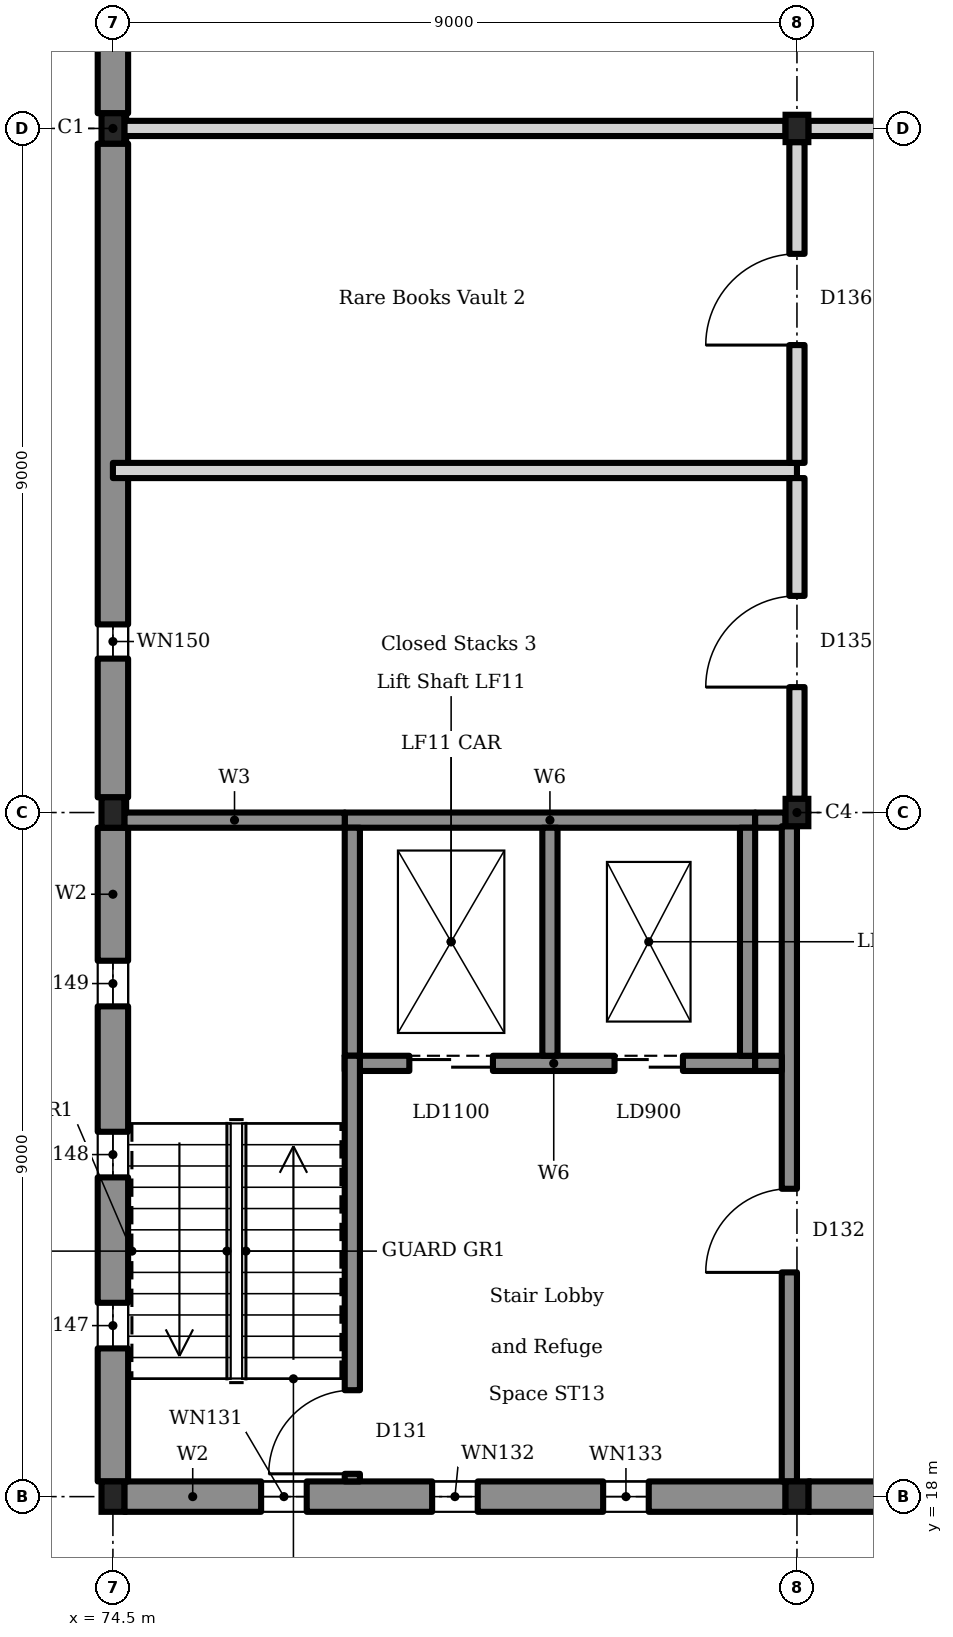
"""IFC4 building model, lengths in metres.
Left out: names, types, materials, properties, quantities, classifications, styles, units other than length and angle.
Written with IfcOpenShell. Run it as: python <this file> out.ifc"""

import sys

from ifc_helpers import new_model, si_unit, direction, frame, frame_2d, origin, origin_2d, place, context, subcontext, project, spatial, rectangle, i_section, extrude, element, fill, save


model = new_model("IFC4")
c1 = context("Model", 3, precision=1e-05, world=origin(), true_north=direction((0.0, 1.0)))
c2 = subcontext(c1, "Body", "Model", "MODEL_VIEW")
j1 = project(units=[si_unit("LENGTHUNIT", "METRE"), si_unit("PLANEANGLEUNIT", "RADIAN")], contexts=[c1])
p1 = place(None, origin())
s1 = spatial("IfcSite", under=j1, at=p1, CompositionType="ELEMENT")
p2 = place(p1, origin())
s2 = spatial("IfcBuilding", under=s1, at=p2, CompositionType="ELEMENT")
p3 = place(p2, frame((0.0, 0.0, 18.9)))
s3 = spatial("IfcBuildingStorey", under=s2, at=p3, CompositionType="ELEMENT", Elevation=18.9)
for number, where, z_axis, x_axis in (
    (1, (74.5, 18.0, 0.0), (0.0, 0.0, 1.0), (1.0, 0.0, 0.0)),
    (2, (83.5, 18.0, 0.0), (0.0, 0.0, 1.0), (1.0, 0.0, 0.0)),
    (3, (74.5, 27.0, 0.0), (0.0, 0.0, 1.0), (1.0, 0.0, 0.0)),
):
    element("IfcColumn", number, at=place(p3, frame(where, z_axis=z_axis, x_axis=x_axis)), inside=s3, PredefinedType="COLUMN", context=c2, shape_type="SweptSolid", body=[
        extrude(i_section(OverallWidth=0.3, OverallDepth=0.4, WebThickness=0.013, FlangeThickness=0.024, FilletRadius=0.027, at=origin_2d()), origin(), (0.0, 0.0, 1.0), 4.5),
    ])
p4 = place(p3, frame((83.5, 27.0, 0.0), z_axis=(0.0, 0.0, 1.0), x_axis=(1.0, 0.0, 0.0)))
e4 = element("IfcColumn", 4, at=p4, inside=s3, PredefinedType="COLUMN", context=c2, shape_type="SweptSolid", body=[
    extrude(i_section(OverallWidth=0.3, OverallDepth=0.36, WebThickness=0.012, FlangeThickness=0.022, FilletRadius=0.027, at=origin_2d()), origin(), (0.0, 0.0, 1.0), 4.5),
])
p5 = place(p3, frame((74.5, 36.0, 0.0), z_axis=(0.0, 0.0, 1.0), x_axis=(1.0, 0.0, 0.0)))
e5 = element("IfcColumn", 5, at=p5, inside=s3, PredefinedType="COLUMN", context=c2, shape_type="SweptSolid", body=[
    extrude(i_section(OverallWidth=0.3, OverallDepth=0.4, WebThickness=0.013, FlangeThickness=0.024, FilletRadius=0.027, at=origin_2d()), origin(), (0.0, 0.0, 1.0), 4.5),
])
p6 = place(p3, frame((83.5, 36.0, 0.0), z_axis=(0.0, 0.0, 1.0), x_axis=(1.0, 0.0, 0.0)))
e6 = element("IfcColumn", 6, at=p6, inside=s3, PredefinedType="COLUMN", context=c2, shape_type="SweptSolid", body=[
    extrude(i_section(OverallWidth=0.3, OverallDepth=0.36, WebThickness=0.012, FlangeThickness=0.022, FilletRadius=0.027, at=origin_2d()), origin(), (0.0, 0.0, 1.0), 4.5),
])
p7 = place(p3, frame((77.55, 23.7, 0.0), z_axis=(0.0, 0.0, 1.0), x_axis=(1.0, 0.0, 0.0)))
e7 = element("IfcWall", 7, at=p7, inside=s3, PredefinedType="SOLIDWALL", context=c2, shape_type="SweptSolid", body=[
    extrude(rectangle(XDim=5.4, YDim=0.2, at=frame_2d((2.7, 0.0))), origin(), (0.0, 0.0, 1.0), 4.25),
])
p8 = place(p7, frame((0.85, 0.0, 0.0)))
e8 = element("IfcOpeningElement", 8, at=p8, cuts=e7, PredefinedType="OPENING", context=c2, shape_type="SweptSolid", body=[
    extrude(rectangle(XDim=1.1, YDim=2.1, at=frame_2d((0.55, 1.05))), frame((0.0, 0.11, 0.0), z_axis=(0.0, -1.0, 0.0), x_axis=(1.0, 0.0, 0.0)), (0.0, 0.0, 1.0), 0.22),
])
p9 = place(p7, frame((3.55, 0.0, 0.0)))
e9 = element("IfcOpeningElement", 9, at=p9, cuts=e7, PredefinedType="OPENING", context=c2, shape_type="SweptSolid", body=[
    extrude(rectangle(XDim=0.9, YDim=2.1, at=frame_2d((0.45, 1.05))), frame((0.0, 0.11, 0.0), z_axis=(0.0, -1.0, 0.0), x_axis=(1.0, 0.0, 0.0)), (0.0, 0.0, 1.0), 0.22),
])
p10 = place(p3, frame((77.55, 26.9, 0.0), z_axis=(0.0, 0.0, 1.0), x_axis=(1.0, 0.0, 0.0)))
e10 = element("IfcWall", 10, at=p10, inside=s3, PredefinedType="SOLIDWALL", context=c2, shape_type="SweptSolid", body=[
    extrude(rectangle(XDim=5.4, YDim=0.2, at=frame_2d((2.7, 0.0))), origin(), (0.0, 0.0, 1.0), 4.25),
])
for number, where, z_axis, x_axis in (
    (11, (77.65, 23.8, 0.0), (0.0, 0.0, 1.0), (0.0, 1.0, 0.0)),
    (12, (80.25, 23.8, 0.0), (0.0, 0.0, 1.0), (0.0, 1.0, 0.0)),
    (13, (82.85, 23.8, 0.0), (0.0, 0.0, 1.0), (0.0, 1.0, 0.0)),
):
    element("IfcWall", number, at=place(p3, frame(where, z_axis=z_axis, x_axis=x_axis)), inside=s3, PredefinedType="SOLIDWALL", context=c2, shape_type="SweptSolid", body=[
        extrude(rectangle(XDim=3.0, YDim=0.2, at=frame_2d((1.5, 0.0))), origin(), (0.0, 0.0, 1.0), 4.25),
    ])
p11 = place(p3, frame((74.65, 18.0, 0.0), z_axis=(0.0, 0.0, 1.0), x_axis=(1.0, 0.0, 0.0)))
e14 = element("IfcWall", 14, at=p11, inside=s3, PredefinedType="SOLIDWALL", context=c2, shape_type="SweptSolid", body=[
    extrude(rectangle(XDim=8.7, YDim=0.4, at=frame_2d((4.35, 0.0))), origin(), (0.0, 0.0, 1.0), 4.5),
])
p12 = place(p11, frame((1.8, 0.0, 0.9)))
e15 = element("IfcOpeningElement", 15, at=p12, cuts=e14, PredefinedType="OPENING", context=c2, shape_type="SweptSolid", body=[
    extrude(rectangle(XDim=0.6, YDim=2.4, at=frame_2d((0.3, 1.2))), frame((0.0, 0.21, 0.0), z_axis=(0.0, -1.0, 0.0), x_axis=(1.0, 0.0, 0.0)), (0.0, 0.0, 1.0), 0.42),
])
p13 = place(p11, frame((4.05, 0.0, 0.9)))
e16 = element("IfcOpeningElement", 16, at=p13, cuts=e14, PredefinedType="OPENING", context=c2, shape_type="SweptSolid", body=[
    extrude(rectangle(XDim=0.6, YDim=2.4, at=frame_2d((0.3, 1.2))), frame((0.0, 0.21, 0.0), z_axis=(0.0, -1.0, 0.0), x_axis=(1.0, 0.0, 0.0)), (0.0, 0.0, 1.0), 0.42),
])
p14 = place(p11, frame((6.3, 0.0, 0.9)))
e17 = element("IfcOpeningElement", 17, at=p14, cuts=e14, PredefinedType="OPENING", context=c2, shape_type="SweptSolid", body=[
    extrude(rectangle(XDim=0.6, YDim=2.4, at=frame_2d((0.3, 1.2))), frame((0.0, 0.21, 0.0), z_axis=(0.0, -1.0, 0.0), x_axis=(1.0, 0.0, 0.0)), (0.0, 0.0, 1.0), 0.42),
])
p15 = place(p3, frame((83.65, 18.0, 0.0), z_axis=(0.0, 0.0, 1.0), x_axis=(1.0, 0.0, 0.0)))
e18 = element("IfcWall", 18, at=p15, inside=s3, PredefinedType="SOLIDWALL", context=c2, shape_type="SweptSolid", body=[
    extrude(rectangle(XDim=8.7, YDim=0.4, at=frame_2d((4.35, 0.0))), origin(), (0.0, 0.0, 1.0), 4.5),
])
p16 = place(p15, frame((4.125, 0.0, 0.9)))
e19 = element("IfcOpeningElement", 19, at=p16, cuts=e18, PredefinedType="OPENING", context=c2, shape_type="SweptSolid", body=[
    extrude(rectangle(XDim=0.45, YDim=2.6, at=frame_2d((0.225, 1.3))), frame((0.0, 0.21, 0.0), z_axis=(0.0, -1.0, 0.0), x_axis=(1.0, 0.0, 0.0)), (0.0, 0.0, 1.0), 0.42),
])
p17 = place(p15, frame((6.375, 0.0, 0.9)))
e20 = element("IfcOpeningElement", 20, at=p17, cuts=e18, PredefinedType="OPENING", context=c2, shape_type="SweptSolid", body=[
    extrude(rectangle(XDim=0.45, YDim=2.6, at=frame_2d((0.225, 1.3))), frame((0.0, 0.21, 0.0), z_axis=(0.0, -1.0, 0.0), x_axis=(1.0, 0.0, 0.0)), (0.0, 0.0, 1.0), 0.42),
])
p18 = place(p3, frame((74.5, 18.2, 0.0), z_axis=(0.0, 0.0, 1.0), x_axis=(0.0, 1.0, 0.0)))
e21 = element("IfcWall", 21, at=p18, inside=s3, PredefinedType="SOLIDWALL", context=c2, shape_type="SweptSolid", body=[
    extrude(rectangle(XDim=8.6, YDim=0.4, at=frame_2d((4.3, 0.0))), origin(), (0.0, 0.0, 1.0), 4.5),
])
p19 = place(p18, frame((1.75, 0.0, 0.9)))
e22 = element("IfcOpeningElement", 22, at=p19, cuts=e21, PredefinedType="OPENING", context=c2, shape_type="SweptSolid", body=[
    extrude(rectangle(XDim=0.6, YDim=2.4, at=frame_2d((0.3, 1.2))), frame((0.0, 0.21, 0.0), z_axis=(0.0, -1.0, 0.0), x_axis=(1.0, 0.0, 0.0)), (0.0, 0.0, 1.0), 0.42),
])
p20 = place(p18, frame((4.0, 0.0, 0.9)))
e23 = element("IfcOpeningElement", 23, at=p20, cuts=e21, PredefinedType="OPENING", context=c2, shape_type="SweptSolid", body=[
    extrude(rectangle(XDim=0.6, YDim=2.4, at=frame_2d((0.3, 1.2))), frame((0.0, 0.21, 0.0), z_axis=(0.0, -1.0, 0.0), x_axis=(1.0, 0.0, 0.0)), (0.0, 0.0, 1.0), 0.42),
])
p21 = place(p18, frame((6.25, 0.0, 0.9)))
e24 = element("IfcOpeningElement", 24, at=p21, cuts=e21, PredefinedType="OPENING", context=c2, shape_type="SweptSolid", body=[
    extrude(rectangle(XDim=0.6, YDim=2.4, at=frame_2d((0.3, 1.2))), frame((0.0, 0.21, 0.0), z_axis=(0.0, -1.0, 0.0), x_axis=(1.0, 0.0, 0.0)), (0.0, 0.0, 1.0), 0.42),
])
p22 = place(p3, frame((74.5, 27.2, 0.0), z_axis=(0.0, 0.0, 1.0), x_axis=(0.0, 1.0, 0.0)))
e25 = element("IfcWall", 25, at=p22, inside=s3, PredefinedType="SOLIDWALL", context=c2, shape_type="SweptSolid", body=[
    extrude(rectangle(XDim=8.6, YDim=0.4, at=frame_2d((4.3, 0.0))), origin(), (0.0, 0.0, 1.0), 4.5),
])
p23 = place(p22, frame((1.825, 0.0, 0.9)))
e26 = element("IfcOpeningElement", 26, at=p23, cuts=e25, PredefinedType="OPENING", context=c2, shape_type="SweptSolid", body=[
    extrude(rectangle(XDim=0.45, YDim=2.6, at=frame_2d((0.225, 1.3))), frame((0.0, 0.21, 0.0), z_axis=(0.0, -1.0, 0.0), x_axis=(1.0, 0.0, 0.0)), (0.0, 0.0, 1.0), 0.42),
])
p24 = place(p3, frame((74.5, 36.2, 0.0), z_axis=(0.0, 0.0, 1.0), x_axis=(0.0, 1.0, 0.0)))
e27 = element("IfcWall", 27, at=p24, inside=s3, PredefinedType="SOLIDWALL", context=c2, shape_type="SweptSolid", body=[
    extrude(rectangle(XDim=8.45, YDim=0.4, at=frame_2d((4.225, 0.0))), origin(), (0.0, 0.0, 1.0), 4.5),
])
p25 = place(p24, frame((1.75, 0.0, 0.9)))
e28 = element("IfcOpeningElement", 28, at=p25, cuts=e27, PredefinedType="OPENING", context=c2, shape_type="SweptSolid", body=[
    extrude(rectangle(XDim=0.45, YDim=2.6, at=frame_2d((0.225, 1.3))), frame((0.0, 0.21, 0.0), z_axis=(0.0, -1.0, 0.0), x_axis=(1.0, 0.0, 0.0)), (0.0, 0.0, 1.0), 0.42),
])
p26 = place(p24, frame((4.0, 0.0, 0.9)))
e29 = element("IfcOpeningElement", 29, at=p26, cuts=e27, PredefinedType="OPENING", context=c2, shape_type="SweptSolid", body=[
    extrude(rectangle(XDim=0.45, YDim=2.6, at=frame_2d((0.225, 1.3))), frame((0.0, 0.21, 0.0), z_axis=(0.0, -1.0, 0.0), x_axis=(1.0, 0.0, 0.0)), (0.0, 0.0, 1.0), 0.42),
])
p27 = place(p24, frame((6.25, 0.0, 0.9)))
e30 = element("IfcOpeningElement", 30, at=p27, cuts=e27, PredefinedType="OPENING", context=c2, shape_type="SweptSolid", body=[
    extrude(rectangle(XDim=0.45, YDim=2.6, at=frame_2d((0.225, 1.3))), frame((0.0, 0.21, 0.0), z_axis=(0.0, -1.0, 0.0), x_axis=(1.0, 0.0, 0.0)), (0.0, 0.0, 1.0), 0.42),
])
p28 = place(p3, frame((74.65, 26.9, 0.0), z_axis=(0.0, 0.0, 1.0), x_axis=(1.0, 0.0, 0.0)))
e31 = element("IfcWall", 31, at=p28, inside=s3, PredefinedType="SOLIDWALL", context=c2, shape_type="SweptSolid", body=[
    extrude(rectangle(XDim=2.9, YDim=0.2, at=frame_2d((1.45, 0.0))), origin(), (0.0, 0.0, 1.0), 4.25),
])
p29 = place(p3, frame((82.95, 26.9, 0.0), z_axis=(0.0, 0.0, 1.0), x_axis=(1.0, 0.0, 0.0)))
e32 = element("IfcWall", 32, at=p29, inside=s3, PredefinedType="SOLIDWALL", context=c2, shape_type="SweptSolid", body=[
    extrude(rectangle(XDim=0.4, YDim=0.2, at=frame_2d((0.2, 0.0))), origin(), (0.0, 0.0, 1.0), 4.25),
])
p30 = place(p3, frame((83.4, 18.2, 0.0), z_axis=(0.0, 0.0, 1.0), x_axis=(0.0, 1.0, 0.0)))
e33 = element("IfcWall", 33, at=p30, inside=s3, PredefinedType="SOLIDWALL", context=c2, shape_type="SweptSolid", body=[
    extrude(rectangle(XDim=8.62, YDim=0.2, at=frame_2d((4.31, 0.0))), origin(), (0.0, 0.0, 1.0), 4.25),
])
p31 = place(p30, frame((2.75, 0.0, 0.0)))
e34 = element("IfcOpeningElement", 34, at=p31, cuts=e33, PredefinedType="OPENING", context=c2, shape_type="SweptSolid", body=[
    extrude(rectangle(XDim=1.1, YDim=2.1, at=frame_2d((0.55, 1.05))), frame((0.0, 0.11, 0.0), z_axis=(0.0, -1.0, 0.0), x_axis=(1.0, 0.0, 0.0)), (0.0, 0.0, 1.0), 0.22),
])
p32 = place(p3, frame((77.65, 18.2, 0.0), z_axis=(0.0, 0.0, 1.0), x_axis=(0.0, 1.0, 0.0)))
e35 = element("IfcWall", 35, at=p32, inside=s3, PredefinedType="SOLIDWALL", context=c2, shape_type="SweptSolid", body=[
    extrude(rectangle(XDim=5.6, YDim=0.2, at=frame_2d((2.8, 0.0))), origin(), (0.0, 0.0, 1.0), 4.25),
])
p33 = place(p32, frame((0.1, 0.0, 0.0)))
e36 = element("IfcOpeningElement", 36, at=p33, cuts=e35, PredefinedType="OPENING", context=c2, shape_type="SweptSolid", body=[
    extrude(rectangle(XDim=1.1, YDim=2.1, at=frame_2d((0.55, 1.05))), frame((0.0, 0.11, 0.0), z_axis=(0.0, -1.0, 0.0), x_axis=(1.0, 0.0, 0.0)), (0.0, 0.0, 1.0), 0.22),
])
p34 = place(p3, frame((82.95, 23.7, 0.0), z_axis=(0.0, 0.0, 1.0), x_axis=(1.0, 0.0, 0.0)))
e37 = element("IfcWall", 37, at=p34, inside=s3, PredefinedType="SOLIDWALL", context=c2, shape_type="SweptSolid", body=[
    extrude(rectangle(XDim=0.35, YDim=0.2, at=frame_2d((0.175, 0.0))), origin(), (0.0, 0.0, 1.0), 4.25),
])
p35 = place(p3, frame((74.5, 31.5, 0.0), z_axis=(0.0, 0.0, 1.0), x_axis=(1.0, 0.0, 0.0)))
e38 = element("IfcWall", 38, at=p35, inside=s3, PredefinedType="SOLIDWALL", context=c2, shape_type="SweptSolid", body=[
    extrude(rectangle(XDim=9.0, YDim=0.2, at=frame_2d((4.5, 0.0))), origin(), (0.0, 0.0, 1.0), 3.6),
])
p36 = place(p3, frame((74.65, 36.0, 0.0), z_axis=(0.0, 0.0, 1.0), x_axis=(1.0, 0.0, 0.0)))
e39 = element("IfcWall", 39, at=p36, inside=s3, PredefinedType="SOLIDWALL", context=c2, shape_type="SweptSolid", body=[
    extrude(rectangle(XDim=8.7, YDim=0.2, at=frame_2d((4.35, 0.0))), origin(), (0.0, 0.0, 1.0), 3.6),
])
p37 = place(p3, frame((83.65, 36.0, 0.0), z_axis=(0.0, 0.0, 1.0), x_axis=(1.0, 0.0, 0.0)))
e40 = element("IfcWall", 40, at=p37, inside=s3, PredefinedType="SOLIDWALL", context=c2, shape_type="SweptSolid", body=[
    extrude(rectangle(XDim=6.35, YDim=0.2, at=frame_2d((3.175, 0.0))), origin(), (0.0, 0.0, 1.0), 3.6),
])
p38 = place(p3, frame((83.5, 27.18, 0.0), z_axis=(0.0, 0.0, 1.0), x_axis=(0.0, 1.0, 0.0)))
e41 = element("IfcWall", 41, at=p38, inside=s3, PredefinedType="SOLIDWALL", context=c2, shape_type="SweptSolid", body=[
    extrude(rectangle(XDim=4.22, YDim=0.2, at=frame_2d((2.11, 0.0))), origin(), (0.0, 0.0, 1.0), 3.6),
])
p39 = place(p38, frame((1.47, 0.0, 0.0)))
e42 = element("IfcOpeningElement", 42, at=p39, cuts=e41, PredefinedType="OPENING", context=c2, shape_type="SweptSolid", body=[
    extrude(rectangle(XDim=1.2, YDim=2.1, at=frame_2d((0.6, 1.05))), frame((0.0, 0.11, 0.0), z_axis=(0.0, -1.0, 0.0), x_axis=(1.0, 0.0, 0.0)), (0.0, 0.0, 1.0), 0.22),
])
p40 = place(p3, frame((83.5, 31.6, 0.0), z_axis=(0.0, 0.0, 1.0), x_axis=(0.0, 1.0, 0.0)))
e43 = element("IfcWall", 43, at=p40, inside=s3, PredefinedType="SOLIDWALL", context=c2, shape_type="SweptSolid", body=[
    extrude(rectangle(XDim=4.22, YDim=0.2, at=frame_2d((2.11, 0.0))), origin(), (0.0, 0.0, 1.0), 3.6),
])
p41 = place(p40, frame((1.55, 0.0, 0.0)))
e44 = element("IfcOpeningElement", 44, at=p41, cuts=e43, PredefinedType="OPENING", context=c2, shape_type="SweptSolid", body=[
    extrude(rectangle(XDim=1.2, YDim=2.1, at=frame_2d((0.6, 1.05))), frame((0.0, 0.11, 0.0), z_axis=(0.0, -1.0, 0.0), x_axis=(1.0, 0.0, 0.0)), (0.0, 0.0, 1.0), 0.22),
])
p42 = place(p8, origin())
e45 = element("IfcDoor", 45, at=p42, inside=s3, OperationType="SLIDING_TO_LEFT", PredefinedType="DOOR", context=c2, shape_type="SweptSolid", body=[
    extrude(rectangle(XDim=1.1, YDim=2.1, at=frame_2d((0.55, 1.05))), frame((0.0, 0.025, 0.0), z_axis=(0.0, -1.0, 0.0), x_axis=(1.0, 0.0, 0.0)), (0.0, 0.0, 1.0), 0.05),
])
fill(e8, e45)
p43 = place(p9, origin())
e46 = element("IfcDoor", 46, at=p43, inside=s3, OperationType="SLIDING_TO_LEFT", PredefinedType="DOOR", context=c2, shape_type="SweptSolid", body=[
    extrude(rectangle(XDim=0.9, YDim=2.1, at=frame_2d((0.45, 1.05))), frame((0.0, 0.025, 0.0), z_axis=(0.0, -1.0, 0.0), x_axis=(1.0, 0.0, 0.0)), (0.0, 0.0, 1.0), 0.05),
])
fill(e9, e46)
p44 = place(p12, origin())
e47 = element("IfcWindow", 47, at=p44, inside=s3, PartitioningType="SINGLE_PANEL", PredefinedType="WINDOW", context=c2, shape_type="SweptSolid", body=[
    extrude(rectangle(XDim=0.6, YDim=2.4, at=frame_2d((0.3, 1.2))), frame((0.0, 0.03, 0.0), z_axis=(0.0, -1.0, 0.0), x_axis=(1.0, 0.0, 0.0)), (0.0, 0.0, 1.0), 0.06),
])
fill(e15, e47)
p45 = place(p13, origin())
e48 = element("IfcWindow", 48, at=p45, inside=s3, PartitioningType="SINGLE_PANEL", PredefinedType="WINDOW", context=c2, shape_type="SweptSolid", body=[
    extrude(rectangle(XDim=0.6, YDim=2.4, at=frame_2d((0.3, 1.2))), frame((0.0, 0.03, 0.0), z_axis=(0.0, -1.0, 0.0), x_axis=(1.0, 0.0, 0.0)), (0.0, 0.0, 1.0), 0.06),
])
fill(e16, e48)
p46 = place(p14, origin())
e49 = element("IfcWindow", 49, at=p46, inside=s3, PartitioningType="SINGLE_PANEL", PredefinedType="WINDOW", context=c2, shape_type="SweptSolid", body=[
    extrude(rectangle(XDim=0.6, YDim=2.4, at=frame_2d((0.3, 1.2))), frame((0.0, 0.03, 0.0), z_axis=(0.0, -1.0, 0.0), x_axis=(1.0, 0.0, 0.0)), (0.0, 0.0, 1.0), 0.06),
])
fill(e17, e49)
p47 = place(p19, origin())
e50 = element("IfcWindow", 50, at=p47, inside=s3, PartitioningType="SINGLE_PANEL", PredefinedType="WINDOW", context=c2, shape_type="SweptSolid", body=[
    extrude(rectangle(XDim=0.6, YDim=2.4, at=frame_2d((0.3, 1.2))), frame((0.0, 0.03, 0.0), z_axis=(0.0, -1.0, 0.0), x_axis=(1.0, 0.0, 0.0)), (0.0, 0.0, 1.0), 0.06),
])
fill(e22, e50)
p48 = place(p20, origin())
e51 = element("IfcWindow", 51, at=p48, inside=s3, PartitioningType="SINGLE_PANEL", PredefinedType="WINDOW", context=c2, shape_type="SweptSolid", body=[
    extrude(rectangle(XDim=0.6, YDim=2.4, at=frame_2d((0.3, 1.2))), frame((0.0, 0.03, 0.0), z_axis=(0.0, -1.0, 0.0), x_axis=(1.0, 0.0, 0.0)), (0.0, 0.0, 1.0), 0.06),
])
fill(e23, e51)
p49 = place(p21, origin())
e52 = element("IfcWindow", 52, at=p49, inside=s3, PartitioningType="SINGLE_PANEL", PredefinedType="WINDOW", context=c2, shape_type="SweptSolid", body=[
    extrude(rectangle(XDim=0.6, YDim=2.4, at=frame_2d((0.3, 1.2))), frame((0.0, 0.03, 0.0), z_axis=(0.0, -1.0, 0.0), x_axis=(1.0, 0.0, 0.0)), (0.0, 0.0, 1.0), 0.06),
])
fill(e24, e52)
p50 = place(p23, origin())
e53 = element("IfcWindow", 53, at=p50, inside=s3, PartitioningType="SINGLE_PANEL", PredefinedType="WINDOW", context=c2, shape_type="SweptSolid", body=[
    extrude(rectangle(XDim=0.45, YDim=2.6, at=frame_2d((0.225, 1.3))), frame((0.0, 0.03, 0.0), z_axis=(0.0, -1.0, 0.0), x_axis=(1.0, 0.0, 0.0)), (0.0, 0.0, 1.0), 0.06),
])
fill(e26, e53)
p51 = place(p33, origin())
e54 = element("IfcDoor", 54, at=p51, inside=s3, OperationType="SINGLE_SWING_RIGHT", PredefinedType="DOOR", context=c2, shape_type="SweptSolid", body=[
    extrude(rectangle(XDim=1.1, YDim=2.1, at=frame_2d((0.55, 1.05))), frame((0.0, 0.025, 0.0), z_axis=(0.0, -1.0, 0.0), x_axis=(1.0, 0.0, 0.0)), (0.0, 0.0, 1.0), 0.05),
])
fill(e36, e54)
p52 = place(p31, origin())
e55 = element("IfcDoor", 55, at=p52, inside=s3, OperationType="SINGLE_SWING_RIGHT", PredefinedType="DOOR", context=c2, shape_type="SweptSolid", body=[
    extrude(rectangle(XDim=1.1, YDim=2.1, at=frame_2d((0.55, 1.05))), frame((0.0, 0.025, 0.0), z_axis=(0.0, -1.0, 0.0), x_axis=(1.0, 0.0, 0.0)), (0.0, 0.0, 1.0), 0.05),
])
fill(e34, e55)
p53 = place(p39, origin())
e56 = element("IfcDoor", 56, at=p53, inside=s3, OperationType="DOUBLE_DOOR_SINGLE_SWING", PredefinedType="DOOR", context=c2, shape_type="SweptSolid", body=[
    extrude(rectangle(XDim=1.2, YDim=2.1, at=frame_2d((0.6, 1.05))), frame((0.0, 0.025, 0.0), z_axis=(0.0, -1.0, 0.0), x_axis=(1.0, 0.0, 0.0)), (0.0, 0.0, 1.0), 0.05),
])
fill(e42, e56)
p54 = place(p41, origin())
e57 = element("IfcDoor", 57, at=p54, inside=s3, OperationType="DOUBLE_DOOR_SINGLE_SWING", PredefinedType="DOOR", context=c2, shape_type="SweptSolid", body=[
    extrude(rectangle(XDim=1.2, YDim=2.1, at=frame_2d((0.6, 1.05))), frame((0.0, 0.025, 0.0), z_axis=(0.0, -1.0, 0.0), x_axis=(1.0, 0.0, 0.0)), (0.0, 0.0, 1.0), 0.05),
])
fill(e44, e57)
save(model, sys.argv[1])
